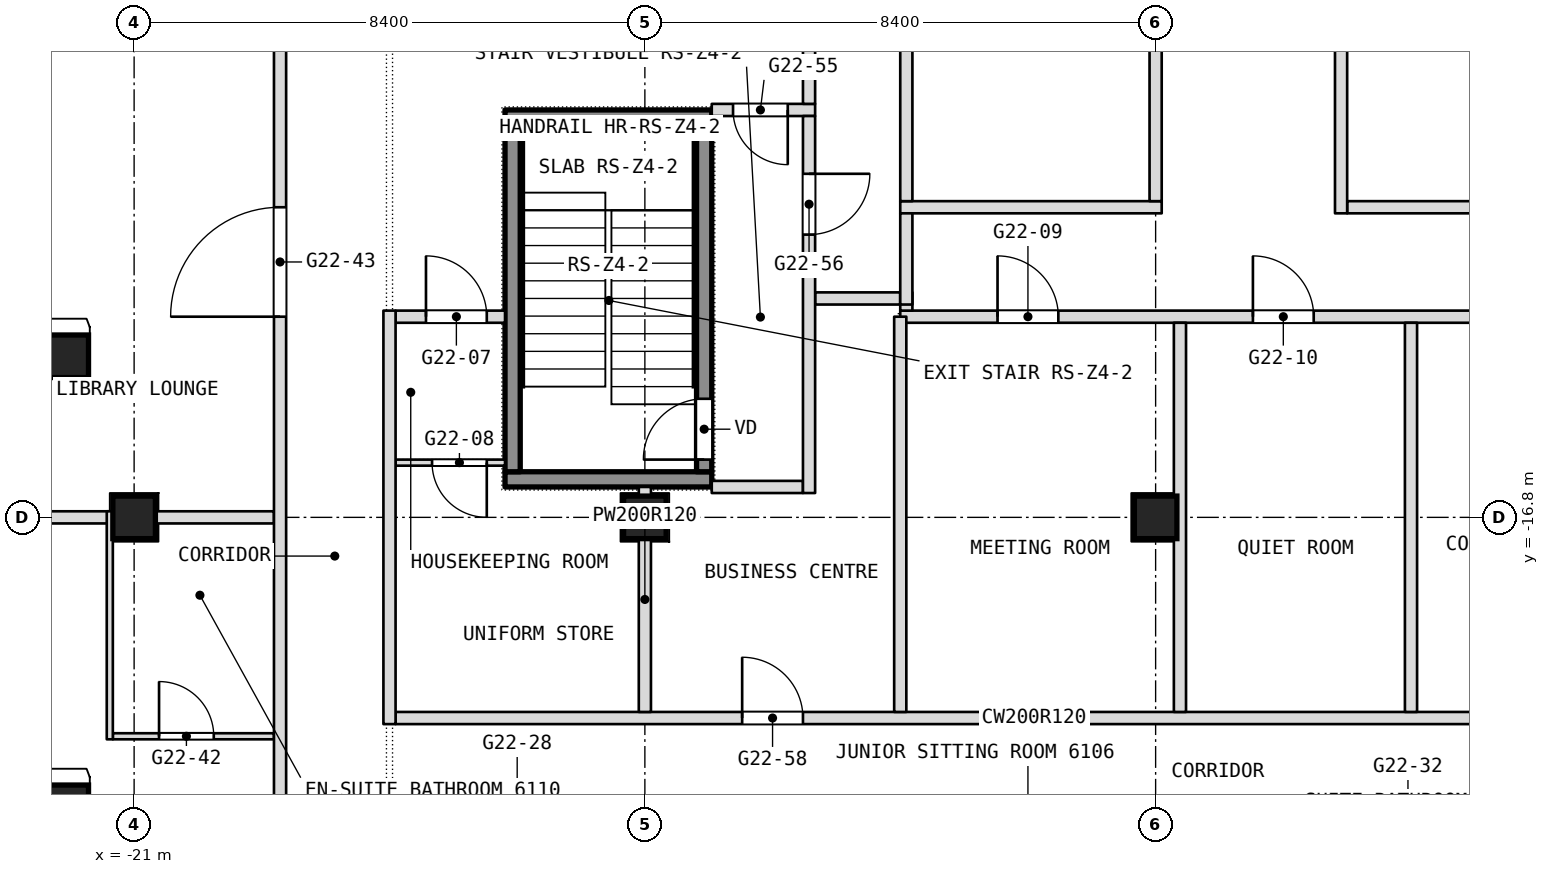
"""IFC4 building model, lengths in metres.
Left out: names, types, materials, properties, quantities, classifications, styles, units other than length and angle.
Written with IfcOpenShell. Run it as: python <this file> out.ifc"""

import sys

from ifc_helpers import new_model, si_unit, direction, frame, frame_2d, origin, origin_2d, place, context, subcontext, project, spatial, rectangle, extrude, element, fill, save


model = new_model("IFC4")
c1 = context("Model", 3, precision=1e-05, world=origin(), true_north=direction((0.0, 1.0)))
c2 = subcontext(c1, "Body", "Model", "MODEL_VIEW")
j1 = project(units=[si_unit("LENGTHUNIT", "METRE"), si_unit("PLANEANGLEUNIT", "RADIAN")], contexts=[c1])
p1 = place(None, origin())
s1 = spatial("IfcSite", under=j1, at=p1, CompositionType="ELEMENT")
p2 = place(p1, origin())
s2 = spatial("IfcBuilding", under=s1, at=p2, CompositionType="ELEMENT")
p3 = place(p2, frame((0.0, 0.0, 266.9)))
s3 = spatial("IfcBuildingStorey", under=s2, at=p3, CompositionType="ELEMENT", Elevation=266.9)
for number, where, z_axis, x_axis in (
    (1, (-21.0, -16.8, 0.0), (0.0, 0.0, 1.0), (1.0, 0.0, 0.0)),
    (2, (-12.6, -16.8, 0.0), (0.0, 0.0, 1.0), (1.0, 0.0, 0.0)),
    (3, (-4.2, -16.8, 0.0), (0.0, 0.0, 1.0), (1.0, 0.0, 0.0)),
    (4, (-22.1, -21.552, 0.0), (0.0, 0.0, 1.0), (1.0, 0.0, 0.0)),
    (5, (-22.1, -14.151, 0.0), (0.0, 0.0, 1.0), (1.0, 0.0, 0.0)),
):
    element("IfcColumn", number, at=place(p3, frame(where, z_axis=z_axis, x_axis=x_axis)), inside=s3, PredefinedType="COLUMN", context=c2, shape_type="SweptSolid", body=[
        extrude(rectangle(XDim=0.7, YDim=0.7, at=origin_2d()), origin(), (0.0, 0.0, 1.0), 3.6),
    ])
p4 = place(p3, frame((-21.35, -20.4, 0.0), z_axis=(0.0, 0.0, 1.0), x_axis=(1.0, 0.0, 0.0)))
e6 = element("IfcWall", 6, at=p4, inside=s3, PredefinedType="PARTITIONING", context=c2, shape_type="SweptSolid", body=[
    extrude(rectangle(XDim=2.65, YDim=0.1, at=frame_2d((1.325, 0.0))), origin(), (0.0, 0.0, 1.0), 3.34),
])
p5 = place(p4, frame((0.76, 0.0, 0.0)))
e7 = element("IfcOpeningElement", 7, at=p5, cuts=e6, PredefinedType="OPENING", context=c2, shape_type="SweptSolid", body=[
    extrude(rectangle(XDim=0.9, YDim=2.1, at=frame_2d((0.45, 1.05))), frame((0.0, 0.05, 0.0), z_axis=(0.0, -1.0, 0.0), x_axis=(1.0, 0.0, 0.0)), (0.0, 0.0, 1.0), 0.1),
])
p6 = place(p3, frame((-16.7, -20.1, 0.0), z_axis=(0.0, 0.0, 1.0), x_axis=(1.0, 0.0, 0.0)))
e8 = element("IfcWall", 8, at=p6, inside=s3, PredefinedType="PARTITIONING", context=c2, shape_type="SweptSolid", body=[
    extrude(rectangle(XDim=21.0, YDim=0.2, at=frame_2d((10.5, 0.0))), origin(), (0.0, 0.0, 1.0), 3.34),
])
p7 = place(p6, frame((5.7, 0.0, 0.0)))
e9 = element("IfcOpeningElement", 9, at=p7, cuts=e8, PredefinedType="OPENING", context=c2, shape_type="SweptSolid", body=[
    extrude(rectangle(XDim=1.0, YDim=2.1, at=frame_2d((0.5, 1.05))), frame((0.0, 0.1, 0.0), z_axis=(0.0, -1.0, 0.0), x_axis=(1.0, 0.0, 0.0)), (0.0, 0.0, 1.0), 0.2),
])
p8 = place(p3, frame((-23.4, -16.8, 0.0), z_axis=(0.0, 0.0, 1.0), x_axis=(1.0, 0.0, 0.0)))
e10 = element("IfcWall", 10, at=p8, inside=s3, PredefinedType="PARTITIONING", context=c2, shape_type="SweptSolid", body=[
    extrude(rectangle(XDim=4.7, YDim=0.2, at=frame_2d((2.35, 0.0))), origin(), (0.0, 0.0, 1.0), 3.0),
])
p9 = place(p3, frame((-11.5, -16.3, 0.0), z_axis=(0.0, 0.0, 1.0), x_axis=(1.0, 0.0, 0.0)))
e11 = element("IfcWall", 11, at=p9, inside=s3, PredefinedType="PARTITIONING", context=c2, shape_type="SweptSolid", body=[
    extrude(rectangle(XDim=1.5, YDim=0.2, at=frame_2d((0.75, 0.0))), origin(), (0.0, 0.0, 1.0), 3.34),
])
p10 = place(p3, frame((-16.7, -15.9, 0.0), z_axis=(0.0, 0.0, 1.0), x_axis=(1.0, 0.0, 0.0)))
e12 = element("IfcWall", 12, at=p10, inside=s3, PredefinedType="PARTITIONING", context=c2, shape_type="SweptSolid", body=[
    extrude(rectangle(XDim=1.8, YDim=0.1, at=frame_2d((0.9, 0.0))), origin(), (0.0, 0.0, 1.0), 3.34),
])
p11 = place(p10, frame((0.6, 0.0, 0.0)))
e13 = element("IfcOpeningElement", 13, at=p11, cuts=e12, PredefinedType="OPENING", context=c2, shape_type="SweptSolid", body=[
    extrude(rectangle(XDim=0.9, YDim=2.1, at=frame_2d((0.45, 1.05))), frame((0.0, 0.05, 0.0), z_axis=(0.0, -1.0, 0.0), x_axis=(1.0, 0.0, 0.0)), (0.0, 0.0, 1.0), 0.1),
])
p12 = place(p3, frame((-16.7, -13.5, 0.0), z_axis=(0.0, 0.0, 1.0), x_axis=(1.0, 0.0, 0.0)))
e14 = element("IfcWall", 14, at=p12, inside=s3, PredefinedType="PARTITIONING", context=c2, shape_type="SweptSolid", body=[
    extrude(rectangle(XDim=1.8, YDim=0.2, at=frame_2d((0.9, 0.0))), origin(), (0.0, 0.0, 1.0), 3.34),
])
p13 = place(p12, frame((0.5, 0.0, 0.0)))
e15 = element("IfcOpeningElement", 15, at=p13, cuts=e14, PredefinedType="OPENING", context=c2, shape_type="SweptSolid", body=[
    extrude(rectangle(XDim=1.0, YDim=2.1, at=frame_2d((0.5, 1.05))), frame((0.0, 0.1, 0.0), z_axis=(0.0, -1.0, 0.0), x_axis=(1.0, 0.0, 0.0)), (0.0, 0.0, 1.0), 0.2),
])
p14 = place(p3, frame((-8.4, -13.5, 0.0), z_axis=(0.0, 0.0, 1.0), x_axis=(1.0, 0.0, 0.0)))
e16 = element("IfcWall", 16, at=p14, inside=s3, PredefinedType="PARTITIONING", context=c2, shape_type="SweptSolid", body=[
    extrude(rectangle(XDim=12.7, YDim=0.2, at=frame_2d((6.35, 0.0))), origin(), (0.0, 0.0, 1.0), 3.34),
])
p15 = place(p14, frame((1.6, 0.0, 0.0)))
e17 = element("IfcOpeningElement", 17, at=p15, cuts=e16, PredefinedType="OPENING", context=c2, shape_type="SweptSolid", body=[
    extrude(rectangle(XDim=1.0, YDim=2.1, at=frame_2d((0.5, 1.05))), frame((0.0, 0.1, 0.0), z_axis=(0.0, -1.0, 0.0), x_axis=(1.0, 0.0, 0.0)), (0.0, 0.0, 1.0), 0.2),
])
p16 = place(p14, frame((5.8, 0.0, 0.0)))
e18 = element("IfcOpeningElement", 18, at=p16, cuts=e16, PredefinedType="OPENING", context=c2, shape_type="SweptSolid", body=[
    extrude(rectangle(XDim=1.0, YDim=2.1, at=frame_2d((0.5, 1.05))), frame((0.0, 0.1, 0.0), z_axis=(0.0, -1.0, 0.0), x_axis=(1.0, 0.0, 0.0)), (0.0, 0.0, 1.0), 0.2),
])
p17 = place(p14, frame((10.0, 0.0, 0.0)))
e19 = element("IfcOpeningElement", 19, at=p17, cuts=e16, PredefinedType="OPENING", context=c2, shape_type="SweptSolid", body=[
    extrude(rectangle(XDim=1.0, YDim=2.1, at=frame_2d((0.5, 1.05))), frame((0.0, 0.1, 0.0), z_axis=(0.0, -1.0, 0.0), x_axis=(1.0, 0.0, 0.0)), (0.0, 0.0, 1.0), 0.2),
])
p18 = place(p3, frame((-9.8, -13.2, 0.0), z_axis=(0.0, 0.0, 1.0), x_axis=(1.0, 0.0, 0.0)))
e20 = element("IfcWall", 20, at=p18, inside=s3, PredefinedType="PARTITIONING", context=c2, shape_type="SweptSolid", body=[
    extrude(rectangle(XDim=1.4, YDim=0.2, at=frame_2d((0.7, 0.0))), origin(), (0.0, 0.0, 1.0), 3.34),
])
p19 = place(p3, frame((-8.4, -11.7, 0.0), z_axis=(0.0, 0.0, 1.0), x_axis=(1.0, 0.0, 0.0)))
e21 = element("IfcWall", 21, at=p19, inside=s3, PredefinedType="PARTITIONING", context=c2, shape_type="SweptSolid", body=[
    extrude(rectangle(XDim=4.3, YDim=0.2, at=frame_2d((2.15, 0.0))), origin(), (0.0, 0.0, 1.0), 3.34),
])
p20 = place(p3, frame((-1.05, -11.7, 0.0), z_axis=(0.0, 0.0, 1.0), x_axis=(1.0, 0.0, 0.0)))
e22 = element("IfcWall", 22, at=p20, inside=s3, PredefinedType="PARTITIONING", context=c2, shape_type="SweptSolid", body=[
    extrude(rectangle(XDim=5.15, YDim=0.2, at=frame_2d((2.575, 0.0))), origin(), (0.0, 0.0, 1.0), 3.34),
])
p21 = place(p3, frame((-11.5, -10.1, 0.0), z_axis=(0.0, 0.0, 1.0), x_axis=(1.0, 0.0, 0.0)))
e23 = element("IfcWall", 23, at=p21, inside=s3, PredefinedType="PARTITIONING", context=c2, shape_type="SweptSolid", body=[
    extrude(rectangle(XDim=1.7, YDim=0.2, at=frame_2d((0.85, 0.0))), origin(), (0.0, 0.0, 1.0), 3.34),
])
p22 = place(p21, frame((0.35, 0.0, 0.0)))
e24 = element("IfcOpeningElement", 24, at=p22, cuts=e23, PredefinedType="OPENING", context=c2, shape_type="SweptSolid", body=[
    extrude(rectangle(XDim=0.9, YDim=2.1, at=frame_2d((0.45, 1.05))), frame((0.0, 0.1, 0.0), z_axis=(0.0, -1.0, 0.0), x_axis=(1.0, 0.0, 0.0)), (0.0, 0.0, 1.0), 0.2),
])
p23 = place(p3, frame((0.0, -20.0, 0.0), z_axis=(0.0, 0.0, 1.0), x_axis=(0.0, 1.0, 0.0)))
e25 = element("IfcWall", 25, at=p23, inside=s3, PredefinedType="PARTITIONING", context=c2, shape_type="SweptSolid", body=[
    extrude(rectangle(XDim=6.4, YDim=0.2, at=frame_2d((3.2, 0.0))), origin(), (0.0, 0.0, 1.0), 3.34),
])
p24 = place(p3, frame((-1.15, -11.8, 0.0), z_axis=(0.0, 0.0, 1.0), x_axis=(0.0, 1.0, 0.0)))
e26 = element("IfcWall", 26, at=p24, inside=s3, PredefinedType="PARTITIONING", context=c2, shape_type="SweptSolid", body=[
    extrude(rectangle(XDim=9.9, YDim=0.2, at=frame_2d((4.95, 0.0))), origin(), (0.0, 0.0, 1.0), 3.34),
])
p25 = place(p3, frame((-3.8, -20.0, 0.0), z_axis=(0.0, 0.0, 1.0), x_axis=(0.0, 1.0, 0.0)))
e27 = element("IfcWall", 27, at=p25, inside=s3, PredefinedType="PARTITIONING", context=c2, shape_type="SweptSolid", body=[
    extrude(rectangle(XDim=6.4, YDim=0.2, at=frame_2d((3.2, 0.0))), origin(), (0.0, 0.0, 1.0), 3.34),
])
p26 = place(p3, frame((-4.2, -11.6, 0.0), z_axis=(0.0, 0.0, 1.0), x_axis=(0.0, 1.0, 0.0)))
e28 = element("IfcWall", 28, at=p26, inside=s3, PredefinedType="PARTITIONING", context=c2, shape_type="SweptSolid", body=[
    extrude(rectangle(XDim=9.7, YDim=0.2, at=frame_2d((4.85, 0.0))), origin(), (0.0, 0.0, 1.0), 3.34),
])
p27 = place(p3, frame((-8.3, -13.4, 0.0), z_axis=(0.0, 0.0, 1.0), x_axis=(0.0, 1.0, 0.0)))
e29 = element("IfcWall", 29, at=p27, inside=s3, PredefinedType="PARTITIONING", context=c2, shape_type="SweptSolid", body=[
    extrude(rectangle(XDim=0.3, YDim=0.2, at=frame_2d((0.15, 0.0))), origin(), (0.0, 0.0, 1.0), 3.34),
])
p28 = place(p3, frame((-8.3, -13.3, 0.0), z_axis=(0.0, 0.0, 1.0), x_axis=(0.0, 1.0, 0.0)))
e30 = element("IfcWall", 30, at=p28, inside=s3, PredefinedType="PARTITIONING", context=c2, shape_type="SweptSolid", body=[
    extrude(rectangle(XDim=1.5, YDim=0.2, at=frame_2d((0.75, 0.0))), origin(), (0.0, 0.0, 1.0), 3.34),
])
p29 = place(p3, frame((-8.3, -11.6, 0.0), z_axis=(0.0, 0.0, 1.0), x_axis=(0.0, 1.0, 0.0)))
e31 = element("IfcWall", 31, at=p29, inside=s3, PredefinedType="PARTITIONING", context=c2, shape_type="SweptSolid", body=[
    extrude(rectangle(XDim=9.7, YDim=0.2, at=frame_2d((4.85, 0.0))), origin(), (0.0, 0.0, 1.0), 3.34),
])
p30 = place(p3, frame((-8.4, -20.0, 0.0), z_axis=(0.0, 0.0, 1.0), x_axis=(0.0, 1.0, 0.0)))
e32 = element("IfcWall", 32, at=p30, inside=s3, PredefinedType="PARTITIONING", context=c2, shape_type="SweptSolid", body=[
    extrude(rectangle(XDim=6.5, YDim=0.2, at=frame_2d((3.25, 0.0))), origin(), (0.0, 0.0, 1.0), 3.34),
])
p31 = place(p3, frame((-9.9, -16.4, 0.0), z_axis=(0.0, 0.0, 1.0), x_axis=(0.0, 1.0, 0.0)))
e33 = element("IfcWall", 33, at=p31, inside=s3, PredefinedType="PARTITIONING", context=c2, shape_type="SweptSolid", body=[
    extrude(rectangle(XDim=6.2, YDim=0.2, at=frame_2d((3.1, 0.0))), origin(), (0.0, 0.0, 1.0), 3.34),
])
p32 = place(p31, frame((4.25, 0.0, 0.0)))
e34 = element("IfcOpeningElement", 34, at=p32, cuts=e33, PredefinedType="OPENING", context=c2, shape_type="SweptSolid", body=[
    extrude(rectangle(XDim=1.0, YDim=2.1, at=frame_2d((0.5, 1.05))), frame((0.0, 0.1, 0.0), z_axis=(0.0, -1.0, 0.0), x_axis=(1.0, 0.0, 0.0)), (0.0, 0.0, 1.0), 0.2),
])
p33 = place(p3, frame((-9.9, -10.0, 0.0), z_axis=(0.0, 0.0, 1.0), x_axis=(0.0, 1.0, 0.0)))
e35 = element("IfcWall", 35, at=p33, inside=s3, PredefinedType="PARTITIONING", context=c2, shape_type="SweptSolid", body=[
    extrude(rectangle(XDim=8.3, YDim=0.2, at=frame_2d((4.15, 0.0))), origin(), (0.0, 0.0, 1.0), 3.34),
])
p34 = place(p3, frame((-12.6, -20.0, 0.0), z_axis=(0.0, 0.0, 1.0), x_axis=(0.0, 1.0, 0.0)))
e36 = element("IfcWall", 36, at=p34, inside=s3, PredefinedType="PARTITIONING", context=c2, shape_type="SweptSolid", body=[
    extrude(rectangle(XDim=3.7, YDim=0.2, at=frame_2d((1.85, 0.0))), origin(), (0.0, 0.0, 1.0), 3.34),
])
p35 = place(p3, frame((-16.8, -20.2, 0.0), z_axis=(0.0, 0.0, 1.0), x_axis=(0.0, 1.0, 0.0)))
e37 = element("IfcWall", 37, at=p35, inside=s3, PredefinedType="PARTITIONING", context=c2, shape_type="SweptSolid", body=[
    extrude(rectangle(XDim=6.8, YDim=0.2, at=frame_2d((3.4, 0.0))), origin(), (0.0, 0.0, 1.0), 3.34),
])
p36 = place(p3, frame((-18.6, -31.794, 0.0), z_axis=(0.0, 0.0, 1.0), x_axis=(0.0, 1.0, 0.0)))
e38 = element("IfcWall", 38, at=p36, inside=s3, PredefinedType="PARTITIONING", context=c2, shape_type="SweptSolid", body=[
    extrude(rectangle(XDim=48.697, YDim=0.2, at=frame_2d((24.349, 0.0))), origin(), (0.0, 0.0, 1.0), 3.34),
])
p37 = place(p36, frame((5.274, 0.0, 0.0)))
e39 = element("IfcOpeningElement", 39, at=p37, cuts=e38, PredefinedType="OPENING", context=c2, shape_type="SweptSolid", body=[
    extrude(rectangle(XDim=1.0, YDim=2.1, at=frame_2d((0.5, 1.05))), frame((0.0, 0.1, 0.0), z_axis=(0.0, -1.0, 0.0), x_axis=(1.0, 0.0, 0.0)), (0.0, 0.0, 1.0), 0.2),
])
p38 = place(p36, frame((9.021, 0.0, 0.0)))
e40 = element("IfcOpeningElement", 40, at=p38, cuts=e38, PredefinedType="OPENING", context=c2, shape_type="SweptSolid", body=[
    extrude(rectangle(XDim=1.0, YDim=2.1, at=frame_2d((0.5, 1.05))), frame((0.0, 0.1, 0.0), z_axis=(0.0, -1.0, 0.0), x_axis=(1.0, 0.0, 0.0)), (0.0, 0.0, 1.0), 0.2),
])
p39 = place(p36, frame((18.294, 0.0, 0.0)))
e41 = element("IfcOpeningElement", 41, at=p39, cuts=e38, PredefinedType="OPENING", context=c2, shape_type="SweptSolid", body=[
    extrude(rectangle(XDim=1.8, YDim=2.1, at=frame_2d((0.9, 1.05))), frame((0.0, 0.1, 0.0), z_axis=(0.0, -1.0, 0.0), x_axis=(1.0, 0.0, 0.0)), (0.0, 0.0, 1.0), 0.2),
])
p40 = place(p36, frame((27.094, 0.0, 0.0)))
e42 = element("IfcOpeningElement", 42, at=p40, cuts=e38, PredefinedType="OPENING", context=c2, shape_type="SweptSolid", body=[
    extrude(rectangle(XDim=1.1, YDim=2.1, at=frame_2d((0.55, 1.05))), frame((0.0, 0.1, 0.0), z_axis=(0.0, -1.0, 0.0), x_axis=(1.0, 0.0, 0.0)), (0.0, 0.0, 1.0), 0.2),
])
p41 = place(p36, frame((35.394, 0.0, 0.0)))
e43 = element("IfcOpeningElement", 43, at=p41, cuts=e38, PredefinedType="OPENING", context=c2, shape_type="SweptSolid", body=[
    extrude(rectangle(XDim=1.1, YDim=2.1, at=frame_2d((0.55, 1.05))), frame((0.0, 0.1, 0.0), z_axis=(0.0, -1.0, 0.0), x_axis=(1.0, 0.0, 0.0)), (0.0, 0.0, 1.0), 0.2),
])
p42 = place(p36, frame((43.894, 0.0, 0.0)))
e44 = element("IfcOpeningElement", 44, at=p42, cuts=e38, PredefinedType="OPENING", context=c2, shape_type="SweptSolid", body=[
    extrude(rectangle(XDim=1.1, YDim=2.1, at=frame_2d((0.55, 1.05))), frame((0.0, 0.1, 0.0), z_axis=(0.0, -1.0, 0.0), x_axis=(1.0, 0.0, 0.0)), (0.0, 0.0, 1.0), 0.2),
])
p43 = place(p3, frame((-21.4, -20.45, 0.0), z_axis=(0.0, 0.0, 1.0), x_axis=(0.0, 1.0, 0.0)))
e45 = element("IfcWall", 45, at=p43, inside=s3, PredefinedType="PARTITIONING", context=c2, shape_type="SweptSolid", body=[
    extrude(rectangle(XDim=3.75, YDim=0.1, at=frame_2d((1.875, 0.0))), origin(), (0.0, 0.0, 1.0), 3.34),
])
for number, where, z_axis, x_axis in (
    (46, (-14.9, -16.175, -0.26), (0.0, 0.0, 1.0), (1.0, 0.0, 0.0)),
    (47, (-14.9, -10.225, -0.26), (0.0, 0.0, 1.0), (1.0, 0.0, 0.0)),
):
    element("IfcWall", number, at=place(p3, frame(where, z_axis=z_axis, x_axis=x_axis)), inside=s3, PredefinedType="SHEAR", context=c2, shape_type="SweptSolid", body=[
        extrude(rectangle(XDim=3.4, YDim=0.25, at=frame_2d((1.7, 0.0))), origin(), (0.0, 0.0, 1.0), 3.96),
    ])
p44 = place(p3, frame((-14.775, -16.05, -0.26), z_axis=(0.0, 0.0, 1.0), x_axis=(0.0, 1.0, 0.0)))
e48 = element("IfcWall", 48, at=p44, inside=s3, PredefinedType="SHEAR", context=c2, shape_type="SweptSolid", body=[
    extrude(rectangle(XDim=5.7, YDim=0.25, at=frame_2d((2.85, 0.0))), origin(), (0.0, 0.0, 1.0), 3.96),
])
p45 = place(p3, frame((-11.625, -16.05, -0.26), z_axis=(0.0, 0.0, 1.0), x_axis=(0.0, 1.0, 0.0)))
e49 = element("IfcWall", 49, at=p45, inside=s3, PredefinedType="SHEAR", context=c2, shape_type="SweptSolid", body=[
    extrude(rectangle(XDim=5.7, YDim=0.25, at=frame_2d((2.85, 0.0))), origin(), (0.0, 0.0, 1.0), 3.96),
])
p46 = place(p45, frame((0.2, 0.0, 0.0)))
e50 = element("IfcOpeningElement", 50, at=p46, cuts=e49, PredefinedType="OPENING", context=c2, shape_type="SweptSolid", body=[
    extrude(rectangle(XDim=1.0, YDim=2.1, at=frame_2d((0.5, 1.05))), frame((0.0, 0.125, 0.0), z_axis=(0.0, -1.0, 0.0), x_axis=(1.0, 0.0, 0.0)), (0.0, 0.0, 1.0), 0.25),
])
p47 = place(p5, origin())
e51 = element("IfcDoor", 51, at=p47, inside=s3, OperationType="SINGLE_SWING_LEFT", PredefinedType="DOOR", context=c2, shape_type="SweptSolid", body=[
    extrude(rectangle(XDim=0.9, YDim=2.1, at=frame_2d((0.45, 1.05))), frame((0.0, 0.025, 0.0), z_axis=(0.0, -1.0, 0.0), x_axis=(1.0, 0.0, 0.0)), (0.0, 0.0, 1.0), 0.05),
])
fill(e7, e51)
p48 = place(p7, origin())
e52 = element("IfcDoor", 52, at=p48, inside=s3, OperationType="SINGLE_SWING_LEFT", PredefinedType="DOOR", context=c2, shape_type="SweptSolid", body=[
    extrude(rectangle(XDim=1.0, YDim=2.1, at=frame_2d((0.5, 1.05))), frame((0.0, 0.025, 0.0), z_axis=(0.0, -1.0, 0.0), x_axis=(1.0, 0.0, 0.0)), (0.0, 0.0, 1.0), 0.05),
])
fill(e9, e52)
p49 = place(p11, origin())
e53 = element("IfcDoor", 53, at=p49, inside=s3, OperationType="SINGLE_SWING_RIGHT", PredefinedType="DOOR", context=c2, shape_type="SweptSolid", body=[
    extrude(rectangle(XDim=0.9, YDim=2.1, at=frame_2d((0.45, 1.05))), frame((0.0, 0.025, 0.0), z_axis=(0.0, -1.0, 0.0), x_axis=(1.0, 0.0, 0.0)), (0.0, 0.0, 1.0), 0.05),
])
fill(e13, e53)
p50 = place(p13, origin())
e54 = element("IfcDoor", 54, at=p50, inside=s3, OperationType="SINGLE_SWING_RIGHT", PredefinedType="DOOR", context=c2, shape_type="SweptSolid", body=[
    extrude(rectangle(XDim=1.0, YDim=2.1, at=frame_2d((0.5, 1.05))), frame((0.0, 0.025, 0.0), z_axis=(0.0, -1.0, 0.0), x_axis=(1.0, 0.0, 0.0)), (0.0, 0.0, 1.0), 0.05),
])
fill(e15, e54)
p51 = place(p15, origin())
e55 = element("IfcDoor", 55, at=p51, inside=s3, OperationType="SINGLE_SWING_LEFT", PredefinedType="DOOR", context=c2, shape_type="SweptSolid", body=[
    extrude(rectangle(XDim=1.0, YDim=2.1, at=frame_2d((0.5, 1.05))), frame((0.0, 0.025, 0.0), z_axis=(0.0, -1.0, 0.0), x_axis=(1.0, 0.0, 0.0)), (0.0, 0.0, 1.0), 0.05),
])
fill(e17, e55)
p52 = place(p16, origin())
e56 = element("IfcDoor", 56, at=p52, inside=s3, OperationType="SINGLE_SWING_LEFT", PredefinedType="DOOR", context=c2, shape_type="SweptSolid", body=[
    extrude(rectangle(XDim=1.0, YDim=2.1, at=frame_2d((0.5, 1.05))), frame((0.0, 0.025, 0.0), z_axis=(0.0, -1.0, 0.0), x_axis=(1.0, 0.0, 0.0)), (0.0, 0.0, 1.0), 0.05),
])
fill(e18, e56)
p53 = place(p22, origin())
e57 = element("IfcDoor", 57, at=p53, inside=s3, OperationType="SINGLE_SWING_LEFT", PredefinedType="DOOR", context=c2, shape_type="SweptSolid", body=[
    extrude(rectangle(XDim=0.9, YDim=2.1, at=frame_2d((0.45, 1.05))), frame((0.0, 0.025, 0.0), z_axis=(0.0, -1.0, 0.0), x_axis=(1.0, 0.0, 0.0)), (0.0, 0.0, 1.0), 0.05),
])
fill(e24, e57)
p54 = place(p32, origin())
e58 = element("IfcDoor", 58, at=p54, inside=s3, OperationType="SINGLE_SWING_RIGHT", PredefinedType="DOOR", context=c2, shape_type="SweptSolid", body=[
    extrude(rectangle(XDim=1.0, YDim=2.1, at=frame_2d((0.5, 1.05))), frame((0.0, 0.025, 0.0), z_axis=(0.0, -1.0, 0.0), x_axis=(1.0, 0.0, 0.0)), (0.0, 0.0, 1.0), 0.05),
])
fill(e34, e58)
p55 = place(p39, origin())
e59 = element("IfcDoor", 59, at=p55, inside=s3, OperationType="DOUBLE_DOOR_SINGLE_SWING", PredefinedType="DOOR", context=c2, shape_type="SweptSolid", body=[
    extrude(rectangle(XDim=1.8, YDim=2.1, at=frame_2d((0.9, 1.05))), frame((0.0, 0.025, 0.0), z_axis=(0.0, -1.0, 0.0), x_axis=(1.0, 0.0, 0.0)), (0.0, 0.0, 1.0), 0.05),
])
fill(e41, e59)
p56 = place(p46, origin())
e60 = element("IfcDoor", 60, at=p56, inside=s3, OperationType="SINGLE_SWING_LEFT", PredefinedType="DOOR", context=c2, shape_type="SweptSolid", body=[
    extrude(rectangle(XDim=1.0, YDim=2.1, at=frame_2d((0.5, 1.05))), frame((0.0, 0.025, 0.0), z_axis=(0.0, -1.0, 0.0), x_axis=(1.0, 0.0, 0.0)), (0.0, 0.0, 1.0), 0.05),
])
fill(e50, e60)
save(model, sys.argv[1])
